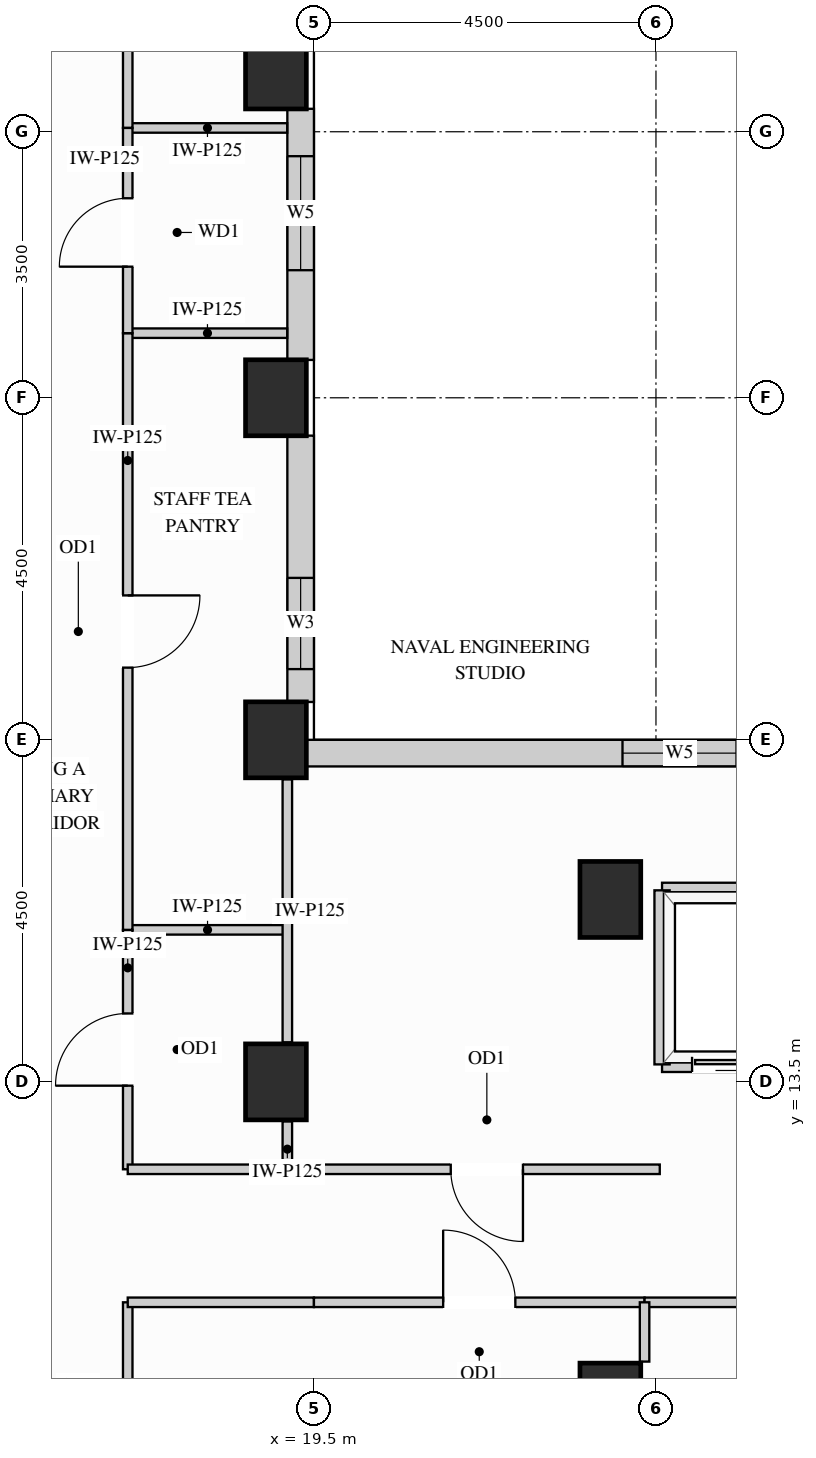
"""IFC4 building model, lengths in metres.
Left out: names, types, materials, properties, quantities, classifications, styles, units other than length and angle.
Written with IfcOpenShell. Run it as: python <this file> out.ifc"""

import sys

from ifc_helpers import new_model, si_unit, direction, frame, frame_2d, origin, origin_2d, place, context, subcontext, project, spatial, rectangle, extrude, source, transform, mapped, element, fill, save


model = new_model("IFC4")
c1 = context("Model", 3, precision=1e-05, world=origin(), true_north=direction((0.0, 1.0)))
c2 = subcontext(c1, "Body", "Model", "MODEL_VIEW")
j1 = project(units=[si_unit("LENGTHUNIT", "METRE"), si_unit("PLANEANGLEUNIT", "RADIAN")], contexts=[c1])
p1 = place(None, origin())
s1 = spatial("IfcSite", under=j1, at=p1, CompositionType="ELEMENT")
p2 = place(p1, origin())
s2 = spatial("IfcBuilding", under=s1, at=p2, CompositionType="ELEMENT")
p3 = place(p2, frame((0.0, 0.0, 175.5)))
s3 = spatial("IfcBuildingStorey", under=s2, at=p3, CompositionType="ELEMENT", Elevation=175.5)
m1 = source(origin(), c2, "Body", "SweptSolid", [
    extrude(rectangle(XDim=0.8, YDim=1.0, at=origin_2d()), origin(), (0.0, 0.0, 1.0), 3.4),
])
for number, where, z_axis, x_axis in (
    (1, (19.0, 13.5, 0.0), (0.0, 0.0, 1.0), (1.0, 0.0, 0.0)),
    (2, (19.0, 18.0, 0.0), (0.0, 0.0, 1.0), (1.0, 0.0, 0.0)),
    (3, (19.0, 22.5, 0.0), (0.0, 0.0, 1.0), (1.0, 0.0, 0.0)),
    (4, (19.0, 26.8, 0.0), (0.0, 0.0, 1.0), (1.0, 0.0, 0.0)),
    (5, (23.4, 15.9, 0.0), (0.0, 0.0, 1.0), (1.0, 0.0, 0.0)),
    (6, (23.4, 9.3, 0.0), (0.0, 0.0, 1.0), (1.0, 0.0, 0.0)),
):
    element("IfcColumn", number, at=place(p3, frame(where, z_axis=z_axis, x_axis=x_axis)), inside=s3, PredefinedType="COLUMN", context=c2, shape_type="MappedRepresentation", body=[
        mapped(m1, transform((0.0, 0.0, 0.0), x_axis=(1.0, 0.0, 0.0), y_axis=(0.0, 1.0, 0.0), z_axis=(0.0, 0.0, 1.0))),
    ])
p4 = place(p3, frame((34.502, 17.825, 0.0), z_axis=(0.0, 0.0, 1.0), x_axis=(-1.0, 0.0, 0.0)))
e7 = element("IfcWall", 7, at=p4, inside=s3, PredefinedType="SOLIDWALL", context=c2, shape_type="SweptSolid", body=[
    extrude(rectangle(XDim=15.104, YDim=0.35, at=frame_2d((7.552, 0.0))), origin(), (0.0, 0.0, 1.0), 3.385),
])
p5 = place(p4, frame((4.131, 0.0, 0.78)))
e8 = element("IfcOpeningElement", 8, at=p5, cuts=e7, PredefinedType="OPENING", context=c2, shape_type="SweptSolid", body=[
    extrude(rectangle(XDim=1.5, YDim=2.0, at=frame_2d((0.75, 1.0))), frame((0.0, 0.185, 0.0), z_axis=(0.0, -1.0, 0.0), x_axis=(1.0, 0.0, 0.0)), (0.0, 0.0, 1.0), 0.37),
])
p6 = place(p4, frame((9.442, 0.0, 0.78)))
e9 = element("IfcOpeningElement", 9, at=p6, cuts=e7, PredefinedType="OPENING", context=c2, shape_type="SweptSolid", body=[
    extrude(rectangle(XDim=1.5, YDim=2.0, at=frame_2d((0.75, 1.0))), frame((0.0, 0.185, 0.0), z_axis=(0.0, -1.0, 0.0), x_axis=(1.0, 0.0, 0.0)), (0.0, 0.0, 1.0), 0.37),
])
p7 = place(p3, frame((19.325, 18.498, 0.0), z_axis=(0.0, 0.0, 1.0), x_axis=(0.0, 1.0, 0.0)))
e10 = element("IfcWall", 10, at=p7, inside=s3, PredefinedType="SOLIDWALL", context=c2, shape_type="SweptSolid", body=[
    extrude(rectangle(XDim=3.504, YDim=0.35, at=frame_2d((1.752, 0.0))), origin(), (0.0, 0.0, 1.0), 2.612),
])
p8 = place(p7, frame((0.433, 0.0, 0.78)))
e11 = element("IfcOpeningElement", 11, at=p8, cuts=e10, PredefinedType="OPENING", context=c2, shape_type="SweptSolid", body=[
    extrude(rectangle(XDim=1.2, YDim=1.652, at=frame_2d((0.6, 0.826))), frame((0.0, 0.185, 0.0), z_axis=(0.0, -1.0, 0.0), x_axis=(1.0, 0.0, 0.0)), (0.0, 0.0, 1.0), 0.37),
])
p9 = place(p3, frame((19.325, 22.998, 0.0), z_axis=(0.0, 0.0, 1.0), x_axis=(0.0, 1.0, 0.0)))
e12 = element("IfcWall", 12, at=p9, inside=s3, PredefinedType="SOLIDWALL", context=c2, shape_type="SweptSolid", body=[
    extrude(rectangle(XDim=3.304, YDim=0.35, at=frame_2d((1.652, 0.0))), origin(), (0.0, 0.0, 1.0), 2.612),
])
p10 = place(p9, frame((1.18, 0.0, 0.78)))
e13 = element("IfcOpeningElement", 13, at=p10, cuts=e12, PredefinedType="OPENING", context=c2, shape_type="SweptSolid", body=[
    extrude(rectangle(XDim=1.5, YDim=1.652, at=frame_2d((0.75, 0.826))), frame((0.0, 0.185, 0.0), z_axis=(0.0, -1.0, 0.0), x_axis=(1.0, 0.0, 0.0)), (0.0, 0.0, 1.0), 0.37),
])
m2 = source(origin(), c2, "Body", "SweptSolid", [
    extrude(rectangle(XDim=2.1, YDim=0.125, at=frame_2d((1.05, 0.0))), origin(), (0.0, 0.0, 1.0), 3.385),
])
p11 = place(p3, frame((17.05, 15.5, 0.0), z_axis=(0.0, 0.0, 1.0), x_axis=(1.0, 0.0, 0.0)))
e14 = element("IfcWall", 14, at=p11, inside=s3, PredefinedType="PARTITIONING", context=c2, shape_type="MappedRepresentation", body=[
    mapped(m2, transform((0.0, 0.0, 0.0), x_axis=(1.0, 0.0, 0.0), y_axis=(0.0, 1.0, 0.0), z_axis=(0.0, 0.0, 1.0))),
])
m3 = source(origin(), c2, "Body", "SweptSolid", [
    extrude(rectangle(XDim=2.098, YDim=0.125, at=frame_2d((1.049, 0.0))), origin(), (0.0, 0.0, 1.0), 3.385),
])
for number, where, z_axis, x_axis in (
    (15, (17.05, 23.35, 0.0), (0.0, 0.0, 1.0), (1.0, 0.0, 0.0)),
    (16, (17.05, 26.05, 0.0), (0.0, 0.0, 1.0), (1.0, 0.0, 0.0)),
):
    element("IfcWall", number, at=place(p3, frame(where, z_axis=z_axis, x_axis=x_axis)), inside=s3, PredefinedType="PARTITIONING", context=c2, shape_type="MappedRepresentation", body=[
        mapped(m3, transform((0.0, 0.0, 0.0), x_axis=(1.0, 0.0, 0.0), y_axis=(0.0, 1.0, 0.0), z_axis=(0.0, 0.0, 1.0))),
    ])
m4 = source(origin(), c2, "Body", "SweptSolid", [
    extrude(rectangle(XDim=0.63, YDim=0.125, at=frame_2d((0.315, 0.0))), origin(), (0.0, 0.0, 1.0), 2.773),
])
p12 = place(p3, frame((19.15, 12.35, 0.0), z_axis=(0.0, 0.0, 1.0), x_axis=(0.0, 1.0, 0.0)))
e17 = element("IfcWall", 17, at=p12, inside=s3, PredefinedType="PARTITIONING", context=c2, shape_type="MappedRepresentation", body=[
    mapped(m4, transform((0.0, 0.0, 0.0), x_axis=(1.0, 0.0, 0.0), y_axis=(0.0, 1.0, 0.0), z_axis=(0.0, 0.0, 1.0))),
])
m5 = source(origin(), c2, "Body", "SweptSolid", [
    extrude(rectangle(XDim=3.46, YDim=0.125, at=frame_2d((1.73, 0.0))), origin(), (0.0, 0.0, 1.0), 2.773),
])
p13 = place(p3, frame((19.15, 14.02, 0.0), z_axis=(0.0, 0.0, 1.0), x_axis=(0.0, 1.0, 0.0)))
e18 = element("IfcWall", 18, at=p13, inside=s3, PredefinedType="PARTITIONING", context=c2, shape_type="MappedRepresentation", body=[
    mapped(m5, transform((0.0, 0.0, 0.0), x_axis=(1.0, 0.0, 0.0), y_axis=(0.0, 1.0, 0.0), z_axis=(0.0, 0.0, 1.0))),
])
p14 = place(p3, frame((17.05, 12.35, 0.0), z_axis=(0.0, 0.0, 1.0), x_axis=(0.0, 1.0, 0.0)))
e19 = element("IfcWall", 19, at=p14, inside=s3, PredefinedType="PARTITIONING", context=c2, shape_type="SweptSolid", body=[
    extrude(rectangle(XDim=3.15, YDim=0.125, at=frame_2d((1.575, 0.0))), origin(), (0.0, 0.0, 1.0), 3.385),
])
p15 = place(p14, frame((1.1, 0.0, 0.0)))
e20 = element("IfcOpeningElement", 20, at=p15, cuts=e19, PredefinedType="OPENING", context=c2, shape_type="SweptSolid", body=[
    extrude(rectangle(XDim=0.95, YDim=2.15, at=frame_2d((0.475, 1.075))), frame((0.0, 0.073, 0.0), z_axis=(0.0, -1.0, 0.0), x_axis=(1.0, 0.0, 0.0)), (0.0, 0.0, 1.0), 0.145),
])
p16 = place(p3, frame((17.05, 15.5, 0.0), z_axis=(0.0, 0.0, 1.0), x_axis=(0.0, 1.0, 0.0)))
e21 = element("IfcWall", 21, at=p16, inside=s3, PredefinedType="PARTITIONING", context=c2, shape_type="SweptSolid", body=[
    extrude(rectangle(XDim=7.85, YDim=0.125, at=frame_2d((3.925, 0.0))), origin(), (0.0, 0.0, 1.0), 3.385),
])
p17 = place(p16, frame((3.45, 0.0, 0.0)))
e22 = element("IfcOpeningElement", 22, at=p17, cuts=e21, PredefinedType="OPENING", context=c2, shape_type="SweptSolid", body=[
    extrude(rectangle(XDim=0.95, YDim=2.15, at=frame_2d((0.475, 1.075))), frame((0.0, 0.073, 0.0), z_axis=(0.0, -1.0, 0.0), x_axis=(1.0, 0.0, 0.0)), (0.0, 0.0, 1.0), 0.145),
])
p18 = place(p3, frame((17.05, 26.05, 0.0), z_axis=(0.0, 0.0, 1.0), x_axis=(0.0, 1.0, 0.0)))
e23 = element("IfcWall", 23, at=p18, inside=s3, PredefinedType="PARTITIONING", context=c2, shape_type="SweptSolid", body=[
    extrude(rectangle(XDim=5.7, YDim=0.125, at=frame_2d((2.85, 0.0))), origin(), (0.0, 0.0, 1.0), 3.385),
])
p19 = place(p18, frame((2.375, 0.0, 0.0)))
e24 = element("IfcOpeningElement", 24, at=p19, cuts=e23, PredefinedType="OPENING", context=c2, shape_type="SweptSolid", body=[
    extrude(rectangle(XDim=0.95, YDim=2.15, at=frame_2d((0.475, 1.075))), frame((0.0, 0.073, 0.0), z_axis=(0.0, -1.0, 0.0), x_axis=(1.0, 0.0, 0.0)), (0.0, 0.0, 1.0), 0.145),
])
p20 = place(p3, frame((17.05, 6.2, 0.0), z_axis=(0.0, 0.0, 1.0), x_axis=(0.0, 1.0, 0.0)))
e25 = element("IfcWall", 25, at=p20, inside=s3, PredefinedType="PARTITIONING", context=c2, shape_type="SweptSolid", body=[
    extrude(rectangle(XDim=4.4, YDim=0.125, at=frame_2d((2.2, 0.0))), origin(), (0.0, 0.0, 1.0), 3.385),
])
p21 = place(p20, frame((1.725, 0.0, 0.0)))
e26 = element("IfcOpeningElement", 26, at=p21, cuts=e25, PredefinedType="OPENING", context=c2, shape_type="SweptSolid", body=[
    extrude(rectangle(XDim=0.95, YDim=2.15, at=frame_2d((0.475, 1.075))), frame((0.0, 0.073, 0.0), z_axis=(0.0, -1.0, 0.0), x_axis=(1.0, 0.0, 0.0)), (0.0, 0.0, 1.0), 0.145),
])
p22 = place(p3, frame((17.05, 23.35, 0.0), z_axis=(0.0, 0.0, 1.0), x_axis=(0.0, 1.0, 0.0)))
e27 = element("IfcWall", 27, at=p22, inside=s3, PredefinedType="PARTITIONING", context=c2, shape_type="SweptSolid", body=[
    extrude(rectangle(XDim=2.7, YDim=0.125, at=frame_2d((1.35, 0.0))), origin(), (0.0, 0.0, 1.0), 3.385),
])
p23 = place(p22, frame((0.875, 0.0, 0.0)))
e28 = element("IfcOpeningElement", 28, at=p23, cuts=e27, PredefinedType="OPENING", context=c2, shape_type="SweptSolid", body=[
    extrude(rectangle(XDim=0.9, YDim=2.15, at=frame_2d((0.45, 1.075))), frame((0.0, 0.073, 0.0), z_axis=(0.0, -1.0, 0.0), x_axis=(1.0, 0.0, 0.0)), (0.0, 0.0, 1.0), 0.145),
])
m6 = source(origin(), c2, "Body", "SweptSolid", [
    extrude(rectangle(XDim=2.45, YDim=0.125, at=frame_2d((1.225, 0.0))), origin(), (0.0, 0.0, 1.0), 3.385),
])
p24 = place(p3, frame((17.05, 12.35, 0.0), z_axis=(0.0, 0.0, 1.0), x_axis=(1.0, 0.0, 0.0)))
e29 = element("IfcWall", 29, at=p24, inside=s3, PredefinedType="PARTITIONING", context=c2, shape_type="MappedRepresentation", body=[
    mapped(m6, transform((0.0, 0.0, 0.0), x_axis=(1.0, 0.0, 0.0), y_axis=(0.0, 1.0, 0.0), z_axis=(0.0, 0.0, 1.0))),
])
p25 = place(p3, frame((19.5, 12.35, 0.0), z_axis=(0.0, 0.0, 1.0), x_axis=(1.0, 0.0, 0.0)))
e30 = element("IfcWall", 30, at=p25, inside=s3, PredefinedType="PARTITIONING", context=c2, shape_type="SweptSolid", body=[
    extrude(rectangle(XDim=4.55, YDim=0.125, at=frame_2d((2.275, 0.0))), origin(), (0.0, 0.0, 1.0), 3.385),
])
p26 = place(p25, frame((1.8, 0.0, 0.0)))
e31 = element("IfcOpeningElement", 31, at=p26, cuts=e30, PredefinedType="OPENING", context=c2, shape_type="SweptSolid", body=[
    extrude(rectangle(XDim=0.95, YDim=2.15, at=frame_2d((0.475, 1.075))), frame((0.0, 0.073, 0.0), z_axis=(0.0, -1.0, 0.0), x_axis=(1.0, 0.0, 0.0)), (0.0, 0.0, 1.0), 0.145),
])
p27 = place(p3, frame((17.05, 10.6, 0.0), z_axis=(0.0, 0.0, 1.0), x_axis=(1.0, 0.0, 0.0)))
e32 = element("IfcWall", 32, at=p27, inside=s3, PredefinedType="PARTITIONING", context=c2, shape_type="MappedRepresentation", body=[
    mapped(m6, transform((0.0, 0.0, 0.0), x_axis=(1.0, 0.0, 0.0), y_axis=(0.0, 1.0, 0.0), z_axis=(0.0, 0.0, 1.0))),
])
p28 = place(p3, frame((19.5, 10.6, 0.0), z_axis=(0.0, 0.0, 1.0), x_axis=(1.0, 0.0, 0.0)))
e33 = element("IfcWall", 33, at=p28, inside=s3, PredefinedType="PARTITIONING", context=c2, shape_type="SweptSolid", body=[
    extrude(rectangle(XDim=4.35, YDim=0.125, at=frame_2d((2.175, 0.0))), origin(), (0.0, 0.0, 1.0), 3.385),
])
p29 = place(p28, frame((1.7, 0.0, 0.0)))
e34 = element("IfcOpeningElement", 34, at=p29, cuts=e33, PredefinedType="OPENING", context=c2, shape_type="SweptSolid", body=[
    extrude(rectangle(XDim=0.95, YDim=2.15, at=frame_2d((0.475, 1.075))), frame((0.0, 0.073, 0.0), z_axis=(0.0, -1.0, 0.0), x_axis=(1.0, 0.0, 0.0)), (0.0, 0.0, 1.0), 0.145),
])
p30 = place(p3, frame((23.85, 10.6, 0.0), z_axis=(0.0, 0.0, 1.0), x_axis=(1.0, 0.0, 0.0)))
e35 = element("IfcWall", 35, at=p30, inside=s3, PredefinedType="PARTITIONING", context=c2, shape_type="SweptSolid", body=[
    extrude(rectangle(XDim=6.0, YDim=0.125, at=frame_2d((3.0, 0.0))), origin(), (0.0, 0.0, 1.0), 3.385),
])
p31 = place(p30, frame((2.525, 0.0, 0.0)))
e36 = element("IfcOpeningElement", 36, at=p31, cuts=e35, PredefinedType="OPENING", context=c2, shape_type="SweptSolid", body=[
    extrude(rectangle(XDim=0.95, YDim=2.15, at=frame_2d((0.475, 1.075))), frame((0.0, 0.073, 0.0), z_axis=(0.0, -1.0, 0.0), x_axis=(1.0, 0.0, 0.0)), (0.0, 0.0, 1.0), 0.145),
])
m7 = source(origin(), c2, "Body", "SweptSolid", [
    extrude(rectangle(XDim=0.78, YDim=0.125, at=frame_2d((0.39, 0.0))), origin(), (0.0, 0.0, 1.0), 3.385),
])
p32 = place(p3, frame((23.85, 9.82, 0.0), z_axis=(0.0, 0.0, 1.0), x_axis=(0.0, 1.0, 0.0)))
e37 = element("IfcWall", 37, at=p32, inside=s3, PredefinedType="PARTITIONING", context=c2, shape_type="MappedRepresentation", body=[
    mapped(m7, transform((0.0, 0.0, 0.0), x_axis=(1.0, 0.0, 0.0), y_axis=(0.0, 1.0, 0.0), z_axis=(0.0, 0.0, 1.0))),
])
m8 = source(origin(), c2, "Body", "SweptSolid", [
    extrude(rectangle(XDim=1.89, YDim=0.2, at=frame_2d((0.945, 0.0))), origin(), (0.0, 0.0, 1.0), 2.773),
])
p33 = place(p3, frame((24.08, 16.02, 0.0), z_axis=(0.0, 0.0, 1.0), x_axis=(1.0, 0.0, 0.0)))
e38 = element("IfcWall", 38, at=p33, inside=s3, PredefinedType="PARTITIONING", context=c2, shape_type="MappedRepresentation", body=[
    mapped(m8, transform((0.0, 0.0, 0.0), x_axis=(1.0, 0.0, 0.0), y_axis=(0.0, 1.0, 0.0), z_axis=(0.0, 0.0, 1.0))),
])
p34 = place(p3, frame((24.08, 13.73, 0.0), z_axis=(0.0, 0.0, 1.0), x_axis=(1.0, 0.0, 0.0)))
e39 = element("IfcWall", 39, at=p34, inside=s3, PredefinedType="PARTITIONING", context=c2, shape_type="SweptSolid", body=[
    extrude(rectangle(XDim=1.89, YDim=0.2, at=frame_2d((0.945, 0.0))), origin(), (0.0, 0.0, 1.0), 2.466),
])
p35 = place(p34, frame((0.395, 0.0, 0.0)))
e40 = element("IfcOpeningElement", 40, at=p35, cuts=e39, PredefinedType="OPENING", context=c2, shape_type="SweptSolid", body=[
    extrude(rectangle(XDim=1.1, YDim=2.2, at=frame_2d((0.55, 1.1))), frame((0.0, 0.11, 0.0), z_axis=(0.0, -1.0, 0.0), x_axis=(1.0, 0.0, 0.0)), (0.0, 0.0, 1.0), 0.22),
])
m9 = source(origin(), c2, "Body", "SweptSolid", [
    extrude(rectangle(XDim=2.29, YDim=0.2, at=frame_2d((1.145, 0.0))), origin(), (0.0, 0.0, 1.0), 3.385),
])
p36 = place(p3, frame((24.08, 13.73, 0.0), z_axis=(0.0, 0.0, 1.0), x_axis=(0.0, 1.0, 0.0)))
e41 = element("IfcWall", 41, at=p36, inside=s3, PredefinedType="PARTITIONING", context=c2, shape_type="MappedRepresentation", body=[
    mapped(m9, transform((0.0, 0.0, 0.0), x_axis=(1.0, 0.0, 0.0), y_axis=(0.0, 1.0, 0.0), z_axis=(0.0, 0.0, 1.0))),
])
m10 = source(origin(), c2, "Body", "SweptSolid", [
    extrude(rectangle(XDim=1.1, YDim=2.2, at=frame_2d((0.55, 1.1))), frame((0.0, 0.025, 0.0), z_axis=(0.0, -1.0, 0.0), x_axis=(1.0, 0.0, 0.0)), (0.0, 0.0, 1.0), 0.05),
])
p37 = place(p35, origin())
e42 = element("IfcDoor", 42, at=p37, inside=s3, OperationType="SLIDING_TO_LEFT", PredefinedType="DOOR", context=c2, shape_type="MappedRepresentation", body=[
    mapped(m10, transform((0.0, 0.0, 0.0), x_axis=(1.0, 0.0, 0.0), y_axis=(0.0, 1.0, 0.0), z_axis=(0.0, 0.0, 1.0))),
])
fill(e40, e42)
m11 = source(origin(), c2, "Body", "SweptSolid", [
    extrude(rectangle(XDim=0.95, YDim=2.15, at=frame_2d((0.475, 1.075))), frame((0.0, 0.025, 0.0), z_axis=(0.0, -1.0, 0.0), x_axis=(1.0, 0.0, 0.0)), (0.0, 0.0, 1.0), 0.05),
])
p38 = place(p15, origin())
e43 = element("IfcDoor", 43, at=p38, inside=s3, OperationType="SINGLE_SWING_LEFT", PredefinedType="DOOR", context=c2, shape_type="MappedRepresentation", body=[
    mapped(m11, transform((0.0, 0.0, 0.0), x_axis=(1.0, 0.0, 0.0), y_axis=(0.0, 1.0, 0.0), z_axis=(0.0, 0.0, 1.0))),
])
fill(e20, e43)
p39 = place(p17, origin())
e44 = element("IfcDoor", 44, at=p39, inside=s3, OperationType="SINGLE_SWING_RIGHT", PredefinedType="DOOR", context=c2, shape_type="MappedRepresentation", body=[
    mapped(m11, transform((0.0, 0.0, 0.0), x_axis=(1.0, 0.0, 0.0), y_axis=(0.0, 1.0, 0.0), z_axis=(0.0, 0.0, 1.0))),
])
fill(e22, e44)
p40 = place(p26, origin())
e45 = element("IfcDoor", 45, at=p40, inside=s3, OperationType="SINGLE_SWING_RIGHT", PredefinedType="DOOR", context=c2, shape_type="MappedRepresentation", body=[
    mapped(m11, transform((0.0, 0.0, 0.0), x_axis=(1.0, 0.0, 0.0), y_axis=(0.0, 1.0, 0.0), z_axis=(0.0, 0.0, 1.0))),
])
fill(e31, e45)
p41 = place(p29, origin())
e46 = element("IfcDoor", 46, at=p41, inside=s3, OperationType="SINGLE_SWING_LEFT", PredefinedType="DOOR", context=c2, shape_type="MappedRepresentation", body=[
    mapped(m11, transform((0.0, 0.0, 0.0), x_axis=(1.0, 0.0, 0.0), y_axis=(0.0, 1.0, 0.0), z_axis=(0.0, 0.0, 1.0))),
])
fill(e34, e46)
m12 = source(origin(), c2, "Body", "SweptSolid", [
    extrude(rectangle(XDim=0.9, YDim=2.15, at=frame_2d((0.45, 1.075))), frame((0.0, 0.025, 0.0), z_axis=(0.0, -1.0, 0.0), x_axis=(1.0, 0.0, 0.0)), (0.0, 0.0, 1.0), 0.05),
])
p42 = place(p23, origin())
e47 = element("IfcDoor", 47, at=p42, inside=s3, OperationType="SINGLE_SWING_LEFT", PredefinedType="DOOR", context=c2, shape_type="MappedRepresentation", body=[
    mapped(m12, transform((0.0, 0.0, 0.0), x_axis=(1.0, 0.0, 0.0), y_axis=(0.0, 1.0, 0.0), z_axis=(0.0, 0.0, 1.0))),
])
fill(e28, e47)
m13 = source(origin(), c2, "Body", "SweptSolid", [
    extrude(rectangle(XDim=1.2, YDim=1.652, at=frame_2d((0.6, 0.826))), frame((0.0, 0.03, 0.0), z_axis=(0.0, -1.0, 0.0), x_axis=(1.0, 0.0, 0.0)), (0.0, 0.0, 1.0), 0.06),
])
p43 = place(p8, origin())
e48 = element("IfcWindow", 48, at=p43, inside=s3, PartitioningType="SINGLE_PANEL", PredefinedType="WINDOW", context=c2, shape_type="MappedRepresentation", body=[
    mapped(m13, transform((0.0, 0.0, 0.0), x_axis=(1.0, 0.0, 0.0), y_axis=(0.0, 1.0, 0.0), z_axis=(0.0, 0.0, 1.0))),
])
fill(e11, e48)
m14 = source(origin(), c2, "Body", "SweptSolid", [
    extrude(rectangle(XDim=1.5, YDim=2.0, at=frame_2d((0.75, 1.0))), frame((0.0, 0.03, 0.0), z_axis=(0.0, -1.0, 0.0), x_axis=(1.0, 0.0, 0.0)), (0.0, 0.0, 1.0), 0.06),
])
p44 = place(p6, origin())
e49 = element("IfcWindow", 49, at=p44, inside=s3, PartitioningType="SINGLE_PANEL", PredefinedType="WINDOW", context=c2, shape_type="MappedRepresentation", body=[
    mapped(m14, transform((0.0, 0.0, 0.0), x_axis=(1.0, 0.0, 0.0), y_axis=(0.0, 1.0, 0.0), z_axis=(0.0, 0.0, 1.0))),
])
fill(e9, e49)
m15 = source(origin(), c2, "Body", "SweptSolid", [
    extrude(rectangle(XDim=1.5, YDim=1.652, at=frame_2d((0.75, 0.826))), frame((0.0, 0.03, 0.0), z_axis=(0.0, -1.0, 0.0), x_axis=(1.0, 0.0, 0.0)), (0.0, 0.0, 1.0), 0.06),
])
p45 = place(p10, origin())
e50 = element("IfcWindow", 50, at=p45, inside=s3, PartitioningType="SINGLE_PANEL", PredefinedType="WINDOW", context=c2, shape_type="MappedRepresentation", body=[
    mapped(m15, transform((0.0, 0.0, 0.0), x_axis=(1.0, 0.0, 0.0), y_axis=(0.0, 1.0, 0.0), z_axis=(0.0, 0.0, 1.0))),
])
fill(e13, e50)
save(model, sys.argv[1])
